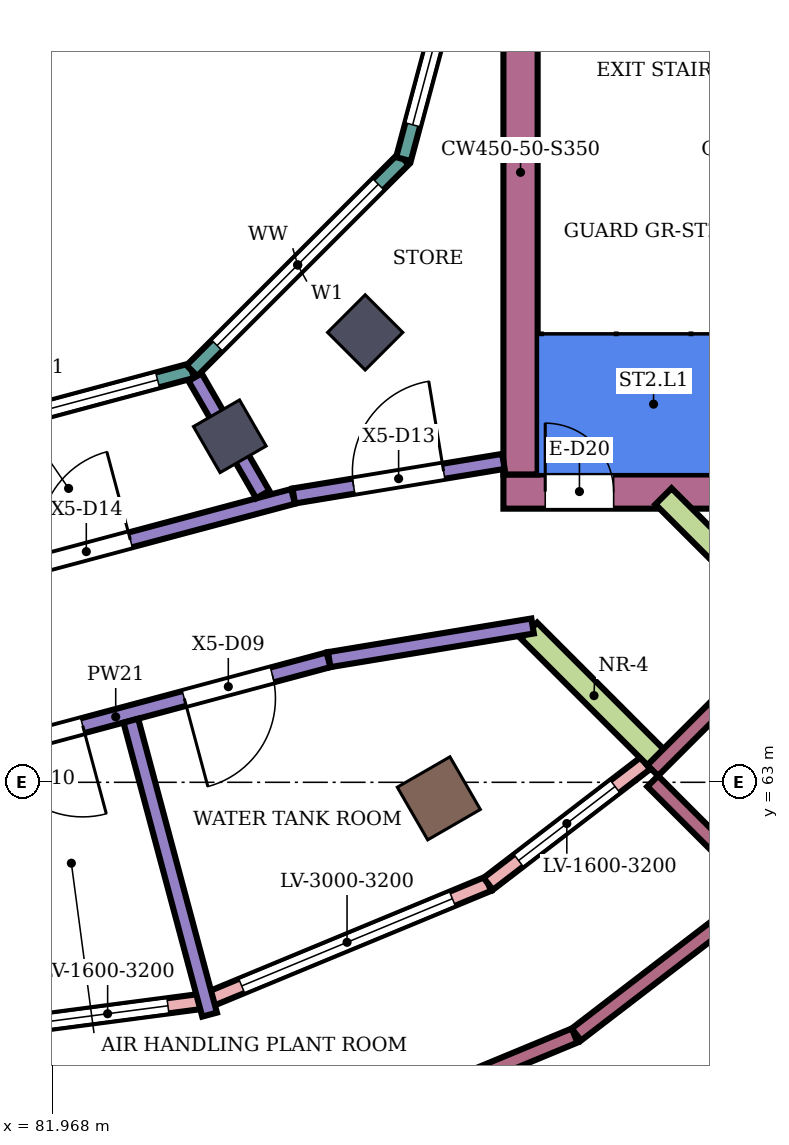
"""IFC4 building model, lengths in metres.
Left out: names, types, materials, properties, quantities, classifications, styles, units other than length and angle.
Written with IfcOpenShell. Run it as: python <this file> out.ifc"""

import sys

from ifc_helpers import new_model, si_unit, direction, frame, frame_2d, origin, origin_2d, place, context, subcontext, project, spatial, rectangle, extrude, element, fill, save


model = new_model("IFC4")
c1 = context("Model", 3, precision=1e-05, world=origin(), true_north=direction((0.0, 1.0)))
c2 = subcontext(c1, "Body", "Model", "MODEL_VIEW")
j1 = project(units=[si_unit("LENGTHUNIT", "METRE"), si_unit("PLANEANGLEUNIT", "RADIAN")], contexts=[c1])
p1 = place(None, origin())
s1 = spatial("IfcSite", under=j1, at=p1, CompositionType="ELEMENT")
p2 = place(p1, origin())
s2 = spatial("IfcBuilding", under=s1, at=p2, CompositionType="ELEMENT")
p3 = place(p2, frame((0.0, 0.0, 333.1)))
s3 = spatial("IfcBuildingStorey", under=s2, at=p3, CompositionType="ELEMENT", Elevation=333.1)
p4 = place(p3, frame((87.05, 62.789, 0.0), z_axis=(0.0, 0.0, 1.0), x_axis=(0.5, -0.866025403784, 0.0)))
e1 = element("IfcColumn", 1, at=p4, inside=s3, PredefinedType="COLUMN", context=c2, shape_type="SweptSolid", body=[
    extrude(rectangle(XDim=0.8, YDim=0.8, at=origin_2d()), origin(), (0.0, 0.0, 1.0), 4.5),
])
for number, where, z_axis, x_axis in (
    (2, (84.3, 67.552, 0.0), (0.0, 0.0, 1.0), (0.5, -0.866, 0.0)),
    (3, (86.081, 68.919, 0.0), (0.0, 0.0, 1.0), (0.707, -0.707, 0.0)),
):
    element("IfcColumn", number, at=place(p3, frame(where, z_axis=z_axis, x_axis=x_axis)), inside=s3, PredefinedType="COLUMN", context=c2, shape_type="SweptSolid", body=[
        extrude(rectangle(XDim=0.7, YDim=0.7, at=origin_2d()), origin(), (0.0, 0.0, 1.0), 4.5),
    ])
p5 = place(p3, frame((87.9, 66.825, 0.0), z_axis=(0.0, 0.0, 1.0), x_axis=(1.0, 0.0, 0.0)))
e4 = element("IfcWall", 4, at=p5, inside=s3, PredefinedType="SHEAR", context=c2, shape_type="SweptSolid", body=[
    extrude(rectangle(XDim=6.3, YDim=0.45, at=frame_2d((3.15, 0.0))), origin(), (0.0, 0.0, 1.0), 4.15),
])
p6 = place(p5, frame((0.55, 0.0, 0.0)))
e5 = element("IfcOpeningElement", 5, at=p6, cuts=e4, PredefinedType="OPENING", context=c2, shape_type="SweptSolid", body=[
    extrude(rectangle(XDim=0.9, YDim=2.1, at=frame_2d((0.45, 1.05))), frame((0.0, 0.235, 0.0), z_axis=(0.0, -1.0, 0.0), x_axis=(1.0, 0.0, 0.0)), (0.0, 0.0, 1.0), 0.47),
])
p7 = place(p3, frame((88.125, 67.05, 0.0), z_axis=(0.0, 0.0, 1.0), x_axis=(0.0, 1.0, 0.0)))
e6 = element("IfcWall", 6, at=p7, inside=s3, PredefinedType="SHEAR", context=c2, shape_type="SweptSolid", body=[
    extrude(rectangle(XDim=7.95, YDim=0.45, at=frame_2d((3.975, 0.0))), origin(), (0.0, 0.0, 1.0), 4.15),
])
p8 = place(p3, frame((81.4, 59.785, 0.0), z_axis=(0.0, 0.0, 1.0), x_axis=(0.991448878041, 0.130495678972, 0.0)))
e7 = element("IfcWall", 7, at=p8, inside=s3, PredefinedType="NOTDEFINED", context=c2, shape_type="SweptSolid", body=[
    extrude(rectangle(XDim=2.608, YDim=0.2, at=frame_2d((1.304, 0.0))), origin(), (0.0, 0.0, 1.0), 4.5),
])
p9 = place(p8, frame((0.504, 0.0, 0.5)))
e8 = element("IfcOpeningElement", 8, at=p9, cuts=e7, PredefinedType="OPENING", context=c2, shape_type="SweptSolid", body=[
    extrude(rectangle(XDim=1.6, YDim=3.2, at=frame_2d((0.8, 1.6))), frame((0.0, 0.11, 0.0), z_axis=(0.0, -1.0, 0.0), x_axis=(1.0, 0.0, 0.0)), (0.0, 0.0, 1.0), 0.22),
])
p10 = place(p3, frame((83.986, 60.125, 0.0), z_axis=(0.0, 0.0, 1.0), x_axis=(0.923858417842, 0.38273440371, 0.0)))
e9 = element("IfcWall", 9, at=p10, inside=s3, PredefinedType="NOTDEFINED", context=c2, shape_type="SweptSolid", body=[
    extrude(rectangle(XDim=4.02, YDim=0.2, at=frame_2d((2.01, 0.0))), origin(), (0.0, 0.0, 1.0), 4.5),
])
p11 = place(p10, frame((0.51, 0.0, 0.5)))
e10 = element("IfcOpeningElement", 10, at=p11, cuts=e9, PredefinedType="OPENING", context=c2, shape_type="SweptSolid", body=[
    extrude(rectangle(XDim=3.0, YDim=3.2, at=frame_2d((1.5, 1.6))), frame((0.0, 0.11, 0.0), z_axis=(0.0, -1.0, 0.0), x_axis=(1.0, 0.0, 0.0)), (0.0, 0.0, 1.0), 0.22),
])
p12 = place(p3, frame((87.699, 61.664, 0.0), z_axis=(0.0, 0.0, 1.0), x_axis=(0.793402901715, 0.608696833859, 0.0)))
e11 = element("IfcWall", 11, at=p12, inside=s3, PredefinedType="NOTDEFINED", context=c2, shape_type="SweptSolid", body=[
    extrude(rectangle(XDim=2.608, YDim=0.2, at=frame_2d((1.304, 0.0))), origin(), (0.0, 0.0, 1.0), 4.5),
])
p13 = place(p12, frame((0.504, 0.0, 0.5)))
e12 = element("IfcOpeningElement", 12, at=p13, cuts=e11, PredefinedType="OPENING", context=c2, shape_type="SweptSolid", body=[
    extrude(rectangle(XDim=1.6, YDim=3.2, at=frame_2d((0.8, 1.6))), frame((0.0, 0.11, 0.0), z_axis=(0.0, -1.0, 0.0), x_axis=(1.0, 0.0, 0.0)), (0.0, 0.0, 1.0), 0.22),
])
for number, where, z_axis, x_axis in (
    (13, (88.238, 64.994, 0.0), (0.0, 0.0, 1.0), (0.707, -0.707, 0.0)),
    (14, (90.006, 66.762, 0.0), (0.0, 0.0, 1.0), (0.707, -0.707, 0.0)),
):
    element("IfcWall", number, at=place(p3, frame(where, z_axis=z_axis, x_axis=x_axis)), inside=s3, PredefinedType="NOTDEFINED", context=c2, shape_type="SweptSolid", body=[
        extrude(rectangle(XDim=2.416, YDim=0.3, at=frame_2d((1.208, 0.0))), origin(), (0.0, 0.0, 1.0), 4.5),
    ])
p14 = place(p3, frame((80.0, 67.396, 0.0), z_axis=(0.0, 0.0, 1.0), x_axis=(0.965933654434, 0.258789828301, 0.0)))
e15 = element("IfcWall", 15, at=p14, inside=s3, PredefinedType="NOTDEFINED", context=c2, shape_type="SweptSolid", body=[
    extrude(rectangle(XDim=3.936, YDim=0.2, at=frame_2d((1.968, 0.0))), origin(), (0.0, 0.0, 1.0), 4.5),
])
p15 = place(p14, frame((0.468, 0.0, 0.9)))
e16 = element("IfcOpeningElement", 16, at=p15, cuts=e15, PredefinedType="OPENING", context=c2, shape_type="SweptSolid", body=[
    extrude(rectangle(XDim=3.0, YDim=2.3, at=frame_2d((1.5, 1.15))), frame((0.0, 0.11, 0.0), z_axis=(0.0, -1.0, 0.0), x_axis=(1.0, 0.0, 0.0)), (0.0, 0.0, 1.0), 0.22),
])
p16 = place(p3, frame((83.802, 68.415, 0.0), z_axis=(0.0, 0.0, 1.0), x_axis=(0.707106781187, 0.707106781187, 0.0)))
e17 = element("IfcWall", 17, at=p16, inside=s3, PredefinedType="NOTDEFINED", context=c2, shape_type="SweptSolid", body=[
    extrude(rectangle(XDim=3.936, YDim=0.2, at=frame_2d((1.968, 0.0))), origin(), (0.0, 0.0, 1.0), 4.5),
])
p17 = place(p16, frame((0.468, 0.0, 0.9)))
e18 = element("IfcOpeningElement", 18, at=p17, cuts=e17, PredefinedType="OPENING", context=c2, shape_type="SweptSolid", body=[
    extrude(rectangle(XDim=3.0, YDim=2.3, at=frame_2d((1.5, 1.15))), frame((0.0, 0.11, 0.0), z_axis=(0.0, -1.0, 0.0), x_axis=(1.0, 0.0, 0.0)), (0.0, 0.0, 1.0), 0.22),
])
p18 = place(p3, frame((86.585, 71.198, 0.0), z_axis=(0.0, 0.0, 1.0), x_axis=(0.258789828301, 0.965933654434, 0.0)))
e19 = element("IfcWall", 19, at=p18, inside=s3, PredefinedType="NOTDEFINED", context=c2, shape_type="SweptSolid", body=[
    extrude(rectangle(XDim=3.936, YDim=0.2, at=frame_2d((1.968, 0.0))), origin(), (0.0, 0.0, 1.0), 4.5),
])
p19 = place(p18, frame((0.468, 0.0, 0.9)))
e20 = element("IfcOpeningElement", 20, at=p19, cuts=e19, PredefinedType="OPENING", context=c2, shape_type="SweptSolid", body=[
    extrude(rectangle(XDim=3.0, YDim=2.3, at=frame_2d((1.5, 1.15))), frame((0.0, 0.11, 0.0), z_axis=(0.0, -1.0, 0.0), x_axis=(1.0, 0.0, 0.0)), (0.0, 0.0, 1.0), 0.22),
])
p20 = place(p3, frame((91.844, 65.136, 0.0), z_axis=(0.0, 0.0, 1.0), x_axis=(-0.707106781187, -0.707106781187, 0.0)))
e21 = element("IfcWall", 21, at=p20, inside=s3, PredefinedType="PARAPET", context=c2, shape_type="SweptSolid", body=[
    extrude(rectangle(XDim=2.8, YDim=0.2, at=frame_2d((1.4, 0.0))), origin(), (0.0, 0.0, 1.0), 1.1),
])
p21 = place(p3, frame((89.864, 63.015, 0.0), z_axis=(0.0, 0.0, 1.0), x_axis=(0.707043717037, -0.707169839712, 0.0)))
e22 = element("IfcWall", 22, at=p21, inside=s3, PredefinedType="PARAPET", context=c2, shape_type="SweptSolid", body=[
    extrude(rectangle(XDim=1.936, YDim=0.2, at=frame_2d((0.968, 0.0))), origin(), (0.0, 0.0, 1.0), 1.1),
])
p22 = place(p3, frame((91.223, 61.496, 0.0), z_axis=(0.0, 0.0, 1.0), x_axis=(-0.79335441758, -0.608760025056, 0.0)))
e23 = element("IfcWall", 23, at=p22, inside=s3, PredefinedType="PARAPET", context=c2, shape_type="SweptSolid", body=[
    extrude(rectangle(XDim=2.98, YDim=0.2, at=frame_2d((1.49, 0.0))), origin(), (0.0, 0.0, 1.0), 1.1),
])
p23 = place(p3, frame((88.836, 59.668, 0.0), z_axis=(0.0, 0.0, 1.0), x_axis=(-0.923884687805, -0.382670986147, 0.0)))
e24 = element("IfcWall", 24, at=p23, inside=s3, PredefinedType="PARAPET", context=c2, shape_type="SweptSolid", body=[
    extrude(rectangle(XDim=4.594, YDim=0.2, at=frame_2d((2.297, 0.0))), origin(), (0.0, 0.0, 1.0), 1.1),
])
p24 = place(p3, frame((80.0, 63.111, 0.0), z_axis=(0.0, 0.0, 1.0), x_axis=(0.965908374176, 0.258884168492, 0.0)))
e25 = element("IfcWall", 25, at=p24, inside=s3, PredefinedType="PARTITIONING", context=c2, shape_type="SweptSolid", body=[
    extrude(rectangle(XDim=5.796, YDim=0.2, at=frame_2d((2.898, 0.0))), origin(), (0.0, 0.0, 1.0), 4.05),
])
p25 = place(p24, frame((3.832, 0.0, 0.0)))
e26 = element("IfcOpeningElement", 26, at=p25, cuts=e25, PredefinedType="OPENING", context=c2, shape_type="SweptSolid", body=[
    extrude(rectangle(XDim=1.2, YDim=2.4, at=frame_2d((0.6, 1.2))), frame((0.0, 0.11, 0.0), z_axis=(0.0, -1.0, 0.0), x_axis=(1.0, 0.0, 0.0)), (0.0, 0.0, 1.0), 0.22),
])
p26 = place(p24, frame((1.248, 0.0, 0.0)))
e27 = element("IfcOpeningElement", 27, at=p26, cuts=e25, PredefinedType="OPENING", context=c2, shape_type="SweptSolid", body=[
    extrude(rectangle(XDim=1.2, YDim=2.4, at=frame_2d((0.6, 1.2))), frame((0.0, 0.11, 0.0), z_axis=(0.0, -1.0, 0.0), x_axis=(1.0, 0.0, 0.0)), (0.0, 0.0, 1.0), 0.22),
])
p27 = place(p3, frame((80.0, 65.39, 0.0), z_axis=(0.0, 0.0, 1.0), x_axis=(0.966134201203, 0.258040123363, 0.0)))
e28 = element("IfcWall", 28, at=p27, inside=s3, PredefinedType="PARTITIONING", context=c2, shape_type="SweptSolid", body=[
    extrude(rectangle(XDim=5.313, YDim=0.2, at=frame_2d((2.657, 0.0))), origin(), (0.0, 0.0, 1.0), 4.05),
])
p28 = place(p27, frame((1.897, 0.0, 0.0)))
e29 = element("IfcOpeningElement", 29, at=p28, cuts=e28, PredefinedType="OPENING", context=c2, shape_type="SweptSolid", body=[
    extrude(rectangle(XDim=1.2, YDim=2.4, at=frame_2d((0.6, 1.2))), frame((0.0, 0.11, 0.0), z_axis=(0.0, -1.0, 0.0), x_axis=(1.0, 0.0, 0.0)), (0.0, 0.0, 1.0), 0.22),
])
p29 = place(p3, frame((82.998, 63.811, 0.0), z_axis=(0.0, 0.0, 1.0), x_axis=(0.258759455785, -0.965941791228, 0.0)))
e30 = element("IfcWall", 30, at=p29, inside=s3, PredefinedType="PARTITIONING", context=c2, shape_type="SweptSolid", body=[
    extrude(rectangle(XDim=4.003, YDim=0.2, at=frame_2d((2.001, 0.0))), origin(), (0.0, 0.0, 1.0), 4.05),
])
p30 = place(p3, frame((83.843, 68.33, 0.0), z_axis=(0.0, 0.0, 1.0), x_axis=(0.499631524239, -0.866238038871, 0.0)))
e31 = element("IfcWall", 31, at=p30, inside=s3, PredefinedType="PARTITIONING", context=c2, shape_type="SweptSolid", body=[
    extrude(rectangle(XDim=1.782, YDim=0.2, at=frame_2d((0.891, 0.0))), origin(), (0.0, 0.0, 1.0), 4.05),
])
p31 = place(p3, frame((85.142, 66.767, 0.0), z_axis=(0.0, 0.0, 1.0), x_axis=(0.986671073711, 0.16272735573, 0.0)))
e32 = element("IfcWall", 32, at=p31, inside=s3, PredefinedType="PARTITIONING", context=c2, shape_type="SweptSolid", body=[
    extrude(rectangle(XDim=2.795, YDim=0.2, at=frame_2d((1.397, 0.0))), origin(), (0.0, 0.0, 1.0), 4.05),
])
p32 = place(p31, frame((0.798, 0.0, 0.0)))
e33 = element("IfcOpeningElement", 33, at=p32, cuts=e32, PredefinedType="OPENING", context=c2, shape_type="SweptSolid", body=[
    extrude(rectangle(XDim=1.2, YDim=2.4, at=frame_2d((0.6, 1.2))), frame((0.0, 0.11, 0.0), z_axis=(0.0, -1.0, 0.0), x_axis=(1.0, 0.0, 0.0)), (0.0, 0.0, 1.0), 0.22),
])
p33 = place(p3, frame((85.608, 64.614, 0.0), z_axis=(0.0, 0.0, 1.0), x_axis=(0.986607186374, 0.163114253806, 0.0)))
e34 = element("IfcWall", 34, at=p33, inside=s3, PredefinedType="PARTITIONING", context=c2, shape_type="SweptSolid", body=[
    extrude(rectangle(XDim=2.712, YDim=0.2, at=frame_2d((1.356, 0.0))), origin(), (0.0, 0.0, 1.0), 4.05),
])
p34 = place(p9, origin())
e35 = element("IfcWindow", 35, at=p34, inside=s3, PartitioningType="SINGLE_PANEL", PredefinedType="USERDEFINED", context=c2, shape_type="SweptSolid", body=[
    extrude(rectangle(XDim=1.6, YDim=3.2, at=frame_2d((0.8, 1.6))), frame((0.0, 0.03, 0.0), z_axis=(0.0, -1.0, 0.0), x_axis=(1.0, 0.0, 0.0)), (0.0, 0.0, 1.0), 0.06),
])
fill(e8, e35)
p35 = place(p11, origin())
e36 = element("IfcWindow", 36, at=p35, inside=s3, PartitioningType="SINGLE_PANEL", PredefinedType="USERDEFINED", context=c2, shape_type="SweptSolid", body=[
    extrude(rectangle(XDim=3.0, YDim=3.2, at=frame_2d((1.5, 1.6))), frame((0.0, 0.03, 0.0), z_axis=(0.0, -1.0, 0.0), x_axis=(1.0, 0.0, 0.0)), (0.0, 0.0, 1.0), 0.06),
])
fill(e10, e36)
p36 = place(p13, origin())
e37 = element("IfcWindow", 37, at=p36, inside=s3, PartitioningType="SINGLE_PANEL", PredefinedType="USERDEFINED", context=c2, shape_type="SweptSolid", body=[
    extrude(rectangle(XDim=1.6, YDim=3.2, at=frame_2d((0.8, 1.6))), frame((0.0, 0.03, 0.0), z_axis=(0.0, -1.0, 0.0), x_axis=(1.0, 0.0, 0.0)), (0.0, 0.0, 1.0), 0.06),
])
fill(e12, e37)
p37 = place(p15, origin())
e38 = element("IfcWindow", 38, at=p37, inside=s3, PartitioningType="SINGLE_PANEL", PredefinedType="WINDOW", context=c2, shape_type="SweptSolid", body=[
    extrude(rectangle(XDim=3.0, YDim=2.3, at=frame_2d((1.5, 1.15))), frame((0.0, 0.03, 0.0), z_axis=(0.0, -1.0, 0.0), x_axis=(1.0, 0.0, 0.0)), (0.0, 0.0, 1.0), 0.06),
])
fill(e16, e38)
p38 = place(p17, origin())
e39 = element("IfcWindow", 39, at=p38, inside=s3, PartitioningType="SINGLE_PANEL", PredefinedType="WINDOW", context=c2, shape_type="SweptSolid", body=[
    extrude(rectangle(XDim=3.0, YDim=2.3, at=frame_2d((1.5, 1.15))), frame((0.0, 0.03, 0.0), z_axis=(0.0, -1.0, 0.0), x_axis=(1.0, 0.0, 0.0)), (0.0, 0.0, 1.0), 0.06),
])
fill(e18, e39)
p39 = place(p19, origin())
e40 = element("IfcWindow", 40, at=p39, inside=s3, PartitioningType="SINGLE_PANEL", PredefinedType="WINDOW", context=c2, shape_type="SweptSolid", body=[
    extrude(rectangle(XDim=3.0, YDim=2.3, at=frame_2d((1.5, 1.15))), frame((0.0, 0.03, 0.0), z_axis=(0.0, -1.0, 0.0), x_axis=(1.0, 0.0, 0.0)), (0.0, 0.0, 1.0), 0.06),
])
fill(e20, e40)
p40 = place(p25, frame((1.2, 0.0, 0.0), z_axis=(0.0, 0.0, 1.0), x_axis=(-1.0, 0.0, 0.0)))
e41 = element("IfcDoor", 41, at=p40, inside=s3, OperationType="SINGLE_SWING_RIGHT", PredefinedType="DOOR", context=c2, shape_type="SweptSolid", body=[
    extrude(rectangle(XDim=1.2, YDim=2.4, at=frame_2d((0.6, 1.2))), frame((0.0, 0.025, 0.0), z_axis=(0.0, -1.0, 0.0), x_axis=(1.0, 0.0, 0.0)), (0.0, 0.0, 1.0), 0.05),
])
fill(e26, e41)
p41 = place(p26, frame((1.2, 0.0, 0.0), z_axis=(0.0, 0.0, 1.0), x_axis=(-1.0, 0.0, 0.0)))
e42 = element("IfcDoor", 42, at=p41, inside=s3, OperationType="SINGLE_SWING_LEFT", PredefinedType="DOOR", context=c2, shape_type="SweptSolid", body=[
    extrude(rectangle(XDim=1.2, YDim=2.4, at=frame_2d((0.6, 1.2))), frame((0.0, 0.025, 0.0), z_axis=(0.0, -1.0, 0.0), x_axis=(1.0, 0.0, 0.0)), (0.0, 0.0, 1.0), 0.05),
])
fill(e27, e42)
p42 = place(p32, origin())
e43 = element("IfcDoor", 43, at=p42, inside=s3, OperationType="SINGLE_SWING_RIGHT", PredefinedType="DOOR", context=c2, shape_type="SweptSolid", body=[
    extrude(rectangle(XDim=1.2, YDim=2.4, at=frame_2d((0.6, 1.2))), frame((0.0, 0.025, 0.0), z_axis=(0.0, -1.0, 0.0), x_axis=(1.0, 0.0, 0.0)), (0.0, 0.0, 1.0), 0.05),
])
fill(e33, e43)
p43 = place(p28, origin())
e44 = element("IfcDoor", 44, at=p43, inside=s3, OperationType="SINGLE_SWING_RIGHT", PredefinedType="DOOR", context=c2, shape_type="SweptSolid", body=[
    extrude(rectangle(XDim=1.2, YDim=2.4, at=frame_2d((0.6, 1.2))), frame((0.0, 0.025, 0.0), z_axis=(0.0, -1.0, 0.0), x_axis=(1.0, 0.0, 0.0)), (0.0, 0.0, 1.0), 0.05),
])
fill(e29, e44)
p44 = place(p6, origin())
e45 = element("IfcDoor", 45, at=p44, inside=s3, OperationType="SINGLE_SWING_LEFT", PredefinedType="DOOR", context=c2, shape_type="SweptSolid", body=[
    extrude(rectangle(XDim=0.9, YDim=2.1, at=frame_2d((0.45, 1.05))), frame((0.0, 0.025, 0.0), z_axis=(0.0, -1.0, 0.0), x_axis=(1.0, 0.0, 0.0)), (0.0, 0.0, 1.0), 0.05),
])
fill(e5, e45)
save(model, sys.argv[1])
